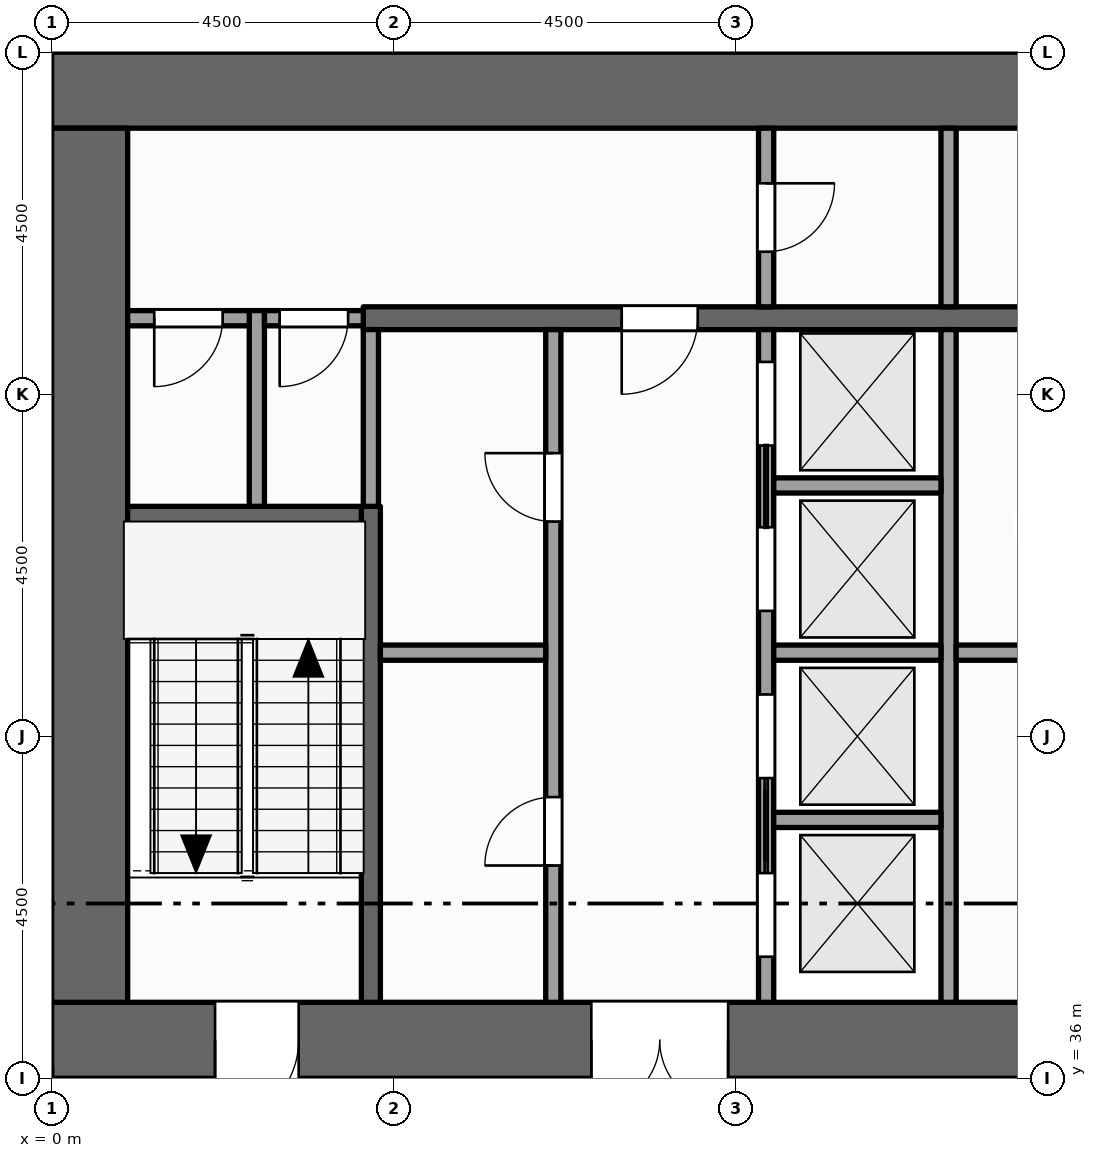
"""IFC4 building model, lengths in metres.
Left out: names, types, materials, properties, quantities, classifications, styles, units other than length and angle.
Written with IfcOpenShell. Run it as: python <this file> out.ifc"""

import sys

from ifc_helpers import new_model, si_unit, direction, frame, frame_2d, origin, place, context, subcontext, project, spatial, rectangle, extrude, element, fill, save


model = new_model("IFC4")
c1 = context("Model", 3, precision=1e-05, world=origin(), true_north=direction((0.0, 1.0)))
c2 = subcontext(c1, "Body", "Model", "MODEL_VIEW")
j1 = project(units=[si_unit("LENGTHUNIT", "METRE"), si_unit("PLANEANGLEUNIT", "RADIAN")], contexts=[c1])
p1 = place(None, origin())
s1 = spatial("IfcSite", under=j1, at=p1, CompositionType="ELEMENT")
p2 = place(p1, origin())
s2 = spatial("IfcBuilding", under=s1, at=p2, CompositionType="ELEMENT")
p3 = place(p2, frame((0.0, 0.0, 155.0)))
s3 = spatial("IfcBuildingStorey", under=s2, at=p3, CompositionType="ELEMENT", Elevation=155.0)
p4 = place(p3, frame((0.0, 36.5, -0.15), z_axis=(0.0, 0.0, 1.0), x_axis=(1.0, 0.0, 0.0)))
e1 = element("IfcWall", 1, at=p4, inside=s3, PredefinedType="SHEAR", context=c2, shape_type="SweptSolid", body=[
    extrude(rectangle(XDim=22.5, YDim=1.0, at=frame_2d((11.25, 0.0))), origin(), (0.0, 0.0, 1.0), 4.0),
])
p5 = place(p4, frame((7.1, 0.0, 0.15)))
e2 = element("IfcOpeningElement", 2, at=p5, cuts=e1, PredefinedType="OPENING", context=c2, shape_type="SweptSolid", body=[
    extrude(rectangle(XDim=1.8, YDim=2.1, at=frame_2d((0.9, 1.05))), frame((0.0, 0.51, 0.0), z_axis=(0.0, -1.0, 0.0), x_axis=(1.0, 0.0, 0.0)), (0.0, 0.0, 1.0), 1.02),
])
p6 = place(p4, frame((13.15, 0.0, 0.15)))
e3 = element("IfcOpeningElement", 3, at=p6, cuts=e1, PredefinedType="OPENING", context=c2, shape_type="SweptSolid", body=[
    extrude(rectangle(XDim=1.1, YDim=2.1, at=frame_2d((0.55, 1.05))), frame((0.0, 0.51, 0.0), z_axis=(0.0, -1.0, 0.0), x_axis=(1.0, 0.0, 0.0)), (0.0, 0.0, 1.0), 1.02),
])
p7 = place(p4, frame((2.15, 0.0, 0.15)))
e4 = element("IfcOpeningElement", 4, at=p7, cuts=e1, PredefinedType="OPENING", context=c2, shape_type="SweptSolid", body=[
    extrude(rectangle(XDim=1.1, YDim=2.1, at=frame_2d((0.55, 1.05))), frame((0.0, 0.51, 0.0), z_axis=(0.0, -1.0, 0.0), x_axis=(1.0, 0.0, 0.0)), (0.0, 0.0, 1.0), 1.02),
])
p8 = place(p4, frame((19.35, 0.0, 0.15)))
e5 = element("IfcOpeningElement", 5, at=p8, cuts=e1, PredefinedType="OPENING", context=c2, shape_type="SweptSolid", body=[
    extrude(rectangle(XDim=1.1, YDim=2.1, at=frame_2d((0.55, 1.05))), frame((0.0, 0.51, 0.0), z_axis=(0.0, -1.0, 0.0), x_axis=(1.0, 0.0, 0.0)), (0.0, 0.0, 1.0), 1.02),
])
p9 = place(p3, frame((0.0, 49.0, -0.15), z_axis=(0.0, 0.0, 1.0), x_axis=(1.0, 0.0, 0.0)))
e6 = element("IfcWall", 6, at=p9, inside=s3, PredefinedType="SHEAR", context=c2, shape_type="SweptSolid", body=[
    extrude(rectangle(XDim=22.5, YDim=1.0, at=frame_2d((11.25, 0.0))), origin(), (0.0, 0.0, 1.0), 4.0),
])
p10 = place(p3, frame((0.5, 37.0, -0.15), z_axis=(0.0, 0.0, 1.0), x_axis=(0.0, 1.0, 0.0)))
e7 = element("IfcWall", 7, at=p10, inside=s3, PredefinedType="SHEAR", context=c2, shape_type="SweptSolid", body=[
    extrude(rectangle(XDim=11.5, YDim=1.0, at=frame_2d((5.75, 0.0))), origin(), (0.0, 0.0, 1.0), 4.0),
])
p11 = place(p3, frame((0.0, 36.0, 0.0), z_axis=(0.0, 0.0, 1.0), x_axis=(-1.0, 0.0, 0.0)))
e8 = element("IfcWall", 8, at=p11, inside=s3, PredefinedType="STANDARD", context=c2, shape_type="SweptSolid", body=[
    extrude(rectangle(XDim=1.05, YDim=0.3, at=frame_2d((0.525, 0.0))), origin(), (0.0, 0.0, 1.0), 2.87),
])
p12 = place(p3, frame((2.7, 43.525, 0.0), z_axis=(0.0, 0.0, 1.0), x_axis=(0.0, 1.0, 0.0)))
e9 = element("IfcWall", 9, at=p12, inside=s3, PredefinedType="PARTITIONING", context=c2, shape_type="SweptSolid", body=[
    extrude(rectangle(XDim=2.575, YDim=0.2, at=frame_2d((1.288, 0.0))), origin(), (0.0, 0.0, 1.0), 3.85),
])
p13 = place(p3, frame((4.2, 37.0, 0.0), z_axis=(0.0, 0.0, 1.0), x_axis=(0.0, 1.0, 0.0)))
e10 = element("IfcWall", 10, at=p13, inside=s3, PredefinedType="SHEAR", context=c2, shape_type="SweptSolid", body=[
    extrude(rectangle(XDim=6.525, YDim=0.25, at=frame_2d((3.262, 0.0))), origin(), (0.0, 0.0, 1.0), 3.85),
])
p14 = place(p3, frame((4.2, 43.525, 0.0), z_axis=(0.0, 0.0, 1.0), x_axis=(0.0, 1.0, 0.0)))
e11 = element("IfcWall", 11, at=p14, inside=s3, PredefinedType="PARTITIONING", context=c2, shape_type="SweptSolid", body=[
    extrude(rectangle(XDim=2.325, YDim=0.2, at=frame_2d((1.163, 0.0))), origin(), (0.0, 0.0, 1.0), 3.85),
])
p15 = place(p3, frame((6.6, 37.0, 0.0), z_axis=(0.0, 0.0, 1.0), x_axis=(0.0, 1.0, 0.0)))
e12 = element("IfcWall", 12, at=p15, inside=s3, PredefinedType="PARTITIONING", context=c2, shape_type="SweptSolid", body=[
    extrude(rectangle(XDim=8.85, YDim=0.2, at=frame_2d((4.425, 0.0))), origin(), (0.0, 0.0, 1.0), 3.85),
])
p16 = place(p15, frame((1.8, 0.0, 0.0)))
e13 = element("IfcOpeningElement", 13, at=p16, cuts=e12, PredefinedType="OPENING", context=c2, shape_type="SweptSolid", body=[
    extrude(rectangle(XDim=0.9, YDim=2.1, at=frame_2d((0.45, 1.05))), frame((0.0, 0.11, 0.0), z_axis=(0.0, -1.0, 0.0), x_axis=(1.0, 0.0, 0.0)), (0.0, 0.0, 1.0), 0.22),
])
p17 = place(p15, frame((6.325, 0.0, 0.0)))
e14 = element("IfcOpeningElement", 14, at=p17, cuts=e12, PredefinedType="OPENING", context=c2, shape_type="SweptSolid", body=[
    extrude(rectangle(XDim=0.9, YDim=2.1, at=frame_2d((0.45, 1.05))), frame((0.0, 0.11, 0.0), z_axis=(0.0, -1.0, 0.0), x_axis=(1.0, 0.0, 0.0)), (0.0, 0.0, 1.0), 0.22),
])
p18 = place(p3, frame((9.4, 37.0, 0.0), z_axis=(0.0, 0.0, 1.0), x_axis=(0.0, 1.0, 0.0)))
e15 = element("IfcWall", 15, at=p18, inside=s3, PredefinedType="SOLIDWALL", context=c2, shape_type="SweptSolid", body=[
    extrude(rectangle(XDim=8.85, YDim=0.2, at=frame_2d((4.425, 0.0))), origin(), (0.0, 0.0, 1.0), 3.85),
])
p19 = place(p18, frame((0.6, 0.0, 0.012)))
e16 = element("IfcOpeningElement", 16, at=p19, cuts=e15, PredefinedType="OPENING", context=c2, shape_type="SweptSolid", body=[
    extrude(rectangle(XDim=1.1, YDim=2.1, at=frame_2d((0.55, 1.05))), frame((0.0, 0.11, 0.0), z_axis=(0.0, -1.0, 0.0), x_axis=(1.0, 0.0, 0.0)), (0.0, 0.0, 1.0), 0.22),
])
p20 = place(p18, frame((2.95, 0.0, 0.012)))
e17 = element("IfcOpeningElement", 17, at=p20, cuts=e15, PredefinedType="OPENING", context=c2, shape_type="SweptSolid", body=[
    extrude(rectangle(XDim=1.1, YDim=2.1, at=frame_2d((0.55, 1.05))), frame((0.0, 0.11, 0.0), z_axis=(0.0, -1.0, 0.0), x_axis=(1.0, 0.0, 0.0)), (0.0, 0.0, 1.0), 0.22),
])
p21 = place(p18, frame((5.15, 0.0, 0.012)))
e18 = element("IfcOpeningElement", 18, at=p21, cuts=e15, PredefinedType="OPENING", context=c2, shape_type="SweptSolid", body=[
    extrude(rectangle(XDim=1.1, YDim=2.1, at=frame_2d((0.55, 1.05))), frame((0.0, 0.11, 0.0), z_axis=(0.0, -1.0, 0.0), x_axis=(1.0, 0.0, 0.0)), (0.0, 0.0, 1.0), 0.22),
])
p22 = place(p18, frame((7.325, 0.0, 0.012)))
e19 = element("IfcOpeningElement", 19, at=p22, cuts=e15, PredefinedType="OPENING", context=c2, shape_type="SweptSolid", body=[
    extrude(rectangle(XDim=1.1, YDim=2.1, at=frame_2d((0.55, 1.05))), frame((0.0, 0.11, 0.0), z_axis=(0.0, -1.0, 0.0), x_axis=(1.0, 0.0, 0.0)), (0.0, 0.0, 1.0), 0.22),
])
p23 = place(p3, frame((9.4, 46.15, 0.0), z_axis=(0.0, 0.0, 1.0), x_axis=(0.0, 1.0, 0.0)))
e20 = element("IfcWall", 20, at=p23, inside=s3, PredefinedType="PARTITIONING", context=c2, shape_type="SweptSolid", body=[
    extrude(rectangle(XDim=2.35, YDim=0.2, at=frame_2d((1.175, 0.0))), origin(), (0.0, 0.0, 1.0), 3.85),
])
p24 = place(p23, frame((0.725, 0.0, 0.0)))
e21 = element("IfcOpeningElement", 21, at=p24, cuts=e20, PredefinedType="OPENING", context=c2, shape_type="SweptSolid", body=[
    extrude(rectangle(XDim=0.9, YDim=2.1, at=frame_2d((0.45, 1.05))), frame((0.0, 0.11, 0.0), z_axis=(0.0, -1.0, 0.0), x_axis=(1.0, 0.0, 0.0)), (0.0, 0.0, 1.0), 0.22),
])
p25 = place(p3, frame((11.8, 37.0, 0.0), z_axis=(0.0, 0.0, 1.0), x_axis=(0.0, 1.0, 0.0)))
e22 = element("IfcWall", 22, at=p25, inside=s3, PredefinedType="SOLIDWALL", context=c2, shape_type="SweptSolid", body=[
    extrude(rectangle(XDim=8.85, YDim=0.2, at=frame_2d((4.425, 0.0))), origin(), (0.0, 0.0, 1.0), 3.85),
])
p26 = place(p3, frame((11.8, 46.15, 0.0), z_axis=(0.0, 0.0, 1.0), x_axis=(0.0, 1.0, 0.0)))
e23 = element("IfcWall", 23, at=p26, inside=s3, PredefinedType="PARTITIONING", context=c2, shape_type="SweptSolid", body=[
    extrude(rectangle(XDim=2.35, YDim=0.2, at=frame_2d((1.175, 0.0))), origin(), (0.0, 0.0, 1.0), 3.85),
])
p27 = place(p3, frame((9.5, 39.4, 0.0), z_axis=(0.0, 0.0, 1.0), x_axis=(1.0, 0.0, 0.0)))
e24 = element("IfcWall", 24, at=p27, inside=s3, PredefinedType="SOLIDWALL", context=c2, shape_type="SweptSolid", body=[
    extrude(rectangle(XDim=2.2, YDim=0.2, at=frame_2d((1.1, 0.0))), origin(), (0.0, 0.0, 1.0), 3.85),
])
p28 = place(p3, frame((4.325, 41.6, 0.0), z_axis=(0.0, 0.0, 1.0), x_axis=(1.0, 0.0, 0.0)))
e25 = element("IfcWall", 25, at=p28, inside=s3, PredefinedType="PARTITIONING", context=c2, shape_type="SweptSolid", body=[
    extrude(rectangle(XDim=2.175, YDim=0.2, at=frame_2d((1.087, 0.0))), origin(), (0.0, 0.0, 1.0), 3.85),
])
p29 = place(p3, frame((9.5, 41.6, 0.0), z_axis=(0.0, 0.0, 1.0), x_axis=(1.0, 0.0, 0.0)))
e26 = element("IfcWall", 26, at=p29, inside=s3, PredefinedType="SOLIDWALL", context=c2, shape_type="SweptSolid", body=[
    extrude(rectangle(XDim=2.2, YDim=0.2, at=frame_2d((1.1, 0.0))), origin(), (0.0, 0.0, 1.0), 3.85),
])
p30 = place(p3, frame((11.9, 41.6, 0.0), z_axis=(0.0, 0.0, 1.0), x_axis=(1.0, 0.0, 0.0)))
e27 = element("IfcWall", 27, at=p30, inside=s3, PredefinedType="PARTITIONING", context=c2, shape_type="SweptSolid", body=[
    extrude(rectangle(XDim=3.6, YDim=0.2, at=frame_2d((1.8, 0.0))), origin(), (0.0, 0.0, 1.0), 3.85),
])
p31 = place(p30, frame((1.3, 0.0, 0.0)))
e28 = element("IfcOpeningElement", 28, at=p31, cuts=e27, PredefinedType="OPENING", context=c2, shape_type="SweptSolid", body=[
    extrude(rectangle(XDim=1.0, YDim=2.1, at=frame_2d((0.5, 1.05))), frame((0.0, 0.11, 0.0), z_axis=(0.0, -1.0, 0.0), x_axis=(1.0, 0.0, 0.0)), (0.0, 0.0, 1.0), 0.22),
])
p32 = place(p3, frame((1.0, 43.4, 0.0), z_axis=(0.0, 0.0, 1.0), x_axis=(1.0, 0.0, 0.0)))
e29 = element("IfcWall", 29, at=p32, inside=s3, PredefinedType="SHEAR", context=c2, shape_type="SweptSolid", body=[
    extrude(rectangle(XDim=3.075, YDim=0.25, at=frame_2d((1.538, 0.0))), origin(), (0.0, 0.0, 1.0), 3.85),
])
p33 = place(p3, frame((9.5, 43.8, 0.0), z_axis=(0.0, 0.0, 1.0), x_axis=(1.0, 0.0, 0.0)))
e30 = element("IfcWall", 30, at=p33, inside=s3, PredefinedType="SOLIDWALL", context=c2, shape_type="SweptSolid", body=[
    extrude(rectangle(XDim=2.2, YDim=0.2, at=frame_2d((1.1, 0.0))), origin(), (0.0, 0.0, 1.0), 3.85),
])
p34 = place(p3, frame((1.0, 46.0, 0.0), z_axis=(0.0, 0.0, 1.0), x_axis=(1.0, 0.0, 0.0)))
e31 = element("IfcWall", 31, at=p34, inside=s3, PredefinedType="PARTITIONING", context=c2, shape_type="SweptSolid", body=[
    extrude(rectangle(XDim=1.6, YDim=0.2, at=frame_2d((0.8, 0.0))), origin(), (0.0, 0.0, 1.0), 3.85),
])
p35 = place(p34, frame((0.35, 0.0, 0.0)))
e32 = element("IfcOpeningElement", 32, at=p35, cuts=e31, PredefinedType="OPENING", context=c2, shape_type="SweptSolid", body=[
    extrude(rectangle(XDim=0.9, YDim=2.1, at=frame_2d((0.45, 1.05))), frame((0.0, 0.11, 0.0), z_axis=(0.0, -1.0, 0.0), x_axis=(1.0, 0.0, 0.0)), (0.0, 0.0, 1.0), 0.22),
])
p36 = place(p3, frame((2.8, 46.0, 0.0), z_axis=(0.0, 0.0, 1.0), x_axis=(1.0, 0.0, 0.0)))
e33 = element("IfcWall", 33, at=p36, inside=s3, PredefinedType="PARTITIONING", context=c2, shape_type="SweptSolid", body=[
    extrude(rectangle(XDim=1.3, YDim=0.2, at=frame_2d((0.65, 0.0))), origin(), (0.0, 0.0, 1.0), 3.85),
])
p37 = place(p36, frame((0.2, 0.0, 0.0)))
e34 = element("IfcOpeningElement", 34, at=p37, cuts=e33, PredefinedType="OPENING", context=c2, shape_type="SweptSolid", body=[
    extrude(rectangle(XDim=0.9, YDim=2.1, at=frame_2d((0.45, 1.05))), frame((0.0, 0.11, 0.0), z_axis=(0.0, -1.0, 0.0), x_axis=(1.0, 0.0, 0.0)), (0.0, 0.0, 1.0), 0.22),
])
p38 = place(p3, frame((4.1, 46.0, 0.0), z_axis=(0.0, 0.0, 1.0), x_axis=(1.0, 0.0, 0.0)))
e35 = element("IfcWall", 35, at=p38, inside=s3, PredefinedType="SHEAR", context=c2, shape_type="SweptSolid", body=[
    extrude(rectangle(XDim=14.5, YDim=0.3, at=frame_2d((7.25, 0.0))), origin(), (0.0, 0.0, 1.0), 3.85),
])
p39 = place(p38, frame((3.4, 0.0, 0.0)))
e36 = element("IfcOpeningElement", 36, at=p39, cuts=e35, PredefinedType="OPENING", context=c2, shape_type="SweptSolid", body=[
    extrude(rectangle(XDim=1.0, YDim=2.1, at=frame_2d((0.5, 1.05))), frame((0.0, 0.16, 0.0), z_axis=(0.0, -1.0, 0.0), x_axis=(1.0, 0.0, 0.0)), (0.0, 0.0, 1.0), 0.32),
])
p40 = place(p38, frame((9.1, 0.0, 0.0)))
e37 = element("IfcOpeningElement", 37, at=p40, cuts=e35, PredefinedType="OPENING", context=c2, shape_type="SweptSolid", body=[
    extrude(rectangle(XDim=1.0, YDim=2.1, at=frame_2d((0.5, 1.05))), frame((0.0, 0.16, 0.0), z_axis=(0.0, -1.0, 0.0), x_axis=(1.0, 0.0, 0.0)), (0.0, 0.0, 1.0), 0.32),
])
p41 = place(p19, origin())
e38 = element("IfcDoor", 38, at=p41, inside=s3, OperationType="SLIDING_TO_RIGHT", PredefinedType="DOOR", context=c2, shape_type="SweptSolid", body=[
    extrude(rectangle(XDim=1.1, YDim=2.1, at=frame_2d((0.55, 1.05))), frame((0.0, 0.025, 0.0), z_axis=(0.0, -1.0, 0.0), x_axis=(1.0, 0.0, 0.0)), (0.0, 0.0, 1.0), 0.05),
])
fill(e16, e38)
p42 = place(p20, origin())
e39 = element("IfcDoor", 39, at=p42, inside=s3, OperationType="SLIDING_TO_LEFT", PredefinedType="DOOR", context=c2, shape_type="SweptSolid", body=[
    extrude(rectangle(XDim=1.1, YDim=2.1, at=frame_2d((0.55, 1.05))), frame((0.0, 0.025, 0.0), z_axis=(0.0, -1.0, 0.0), x_axis=(1.0, 0.0, 0.0)), (0.0, 0.0, 1.0), 0.05),
])
fill(e17, e39)
p43 = place(p21, origin())
e40 = element("IfcDoor", 40, at=p43, inside=s3, OperationType="SLIDING_TO_RIGHT", PredefinedType="DOOR", context=c2, shape_type="SweptSolid", body=[
    extrude(rectangle(XDim=1.1, YDim=2.1, at=frame_2d((0.55, 1.05))), frame((0.0, 0.025, 0.0), z_axis=(0.0, -1.0, 0.0), x_axis=(1.0, 0.0, 0.0)), (0.0, 0.0, 1.0), 0.05),
])
fill(e18, e40)
p44 = place(p22, origin())
e41 = element("IfcDoor", 41, at=p44, inside=s3, OperationType="SLIDING_TO_LEFT", PredefinedType="DOOR", context=c2, shape_type="SweptSolid", body=[
    extrude(rectangle(XDim=1.1, YDim=2.1, at=frame_2d((0.55, 1.05))), frame((0.0, 0.025, 0.0), z_axis=(0.0, -1.0, 0.0), x_axis=(1.0, 0.0, 0.0)), (0.0, 0.0, 1.0), 0.05),
])
fill(e19, e41)
p45 = place(p5, origin())
e42 = element("IfcDoor", 42, at=p45, inside=s3, OperationType="DOUBLE_DOOR_SINGLE_SWING", PredefinedType="DOOR", context=c2, shape_type="SweptSolid", body=[
    extrude(rectangle(XDim=1.8, YDim=2.1, at=frame_2d((0.9, 1.05))), frame((0.0, 0.025, 0.0), z_axis=(0.0, -1.0, 0.0), x_axis=(1.0, 0.0, 0.0)), (0.0, 0.0, 1.0), 0.05),
])
fill(e2, e42)
p46 = place(p39, origin())
e43 = element("IfcDoor", 43, at=p46, inside=s3, OperationType="SINGLE_SWING_LEFT", PredefinedType="DOOR", context=c2, shape_type="SweptSolid", body=[
    extrude(rectangle(XDim=1.0, YDim=2.1, at=frame_2d((0.5, 1.05))), frame((0.0, 0.025, 0.0), z_axis=(0.0, -1.0, 0.0), x_axis=(1.0, 0.0, 0.0)), (0.0, 0.0, 1.0), 0.05),
])
fill(e36, e43)
p47 = place(p24, origin())
e44 = element("IfcDoor", 44, at=p47, inside=s3, OperationType="SINGLE_SWING_RIGHT", PredefinedType="DOOR", context=c2, shape_type="SweptSolid", body=[
    extrude(rectangle(XDim=0.9, YDim=2.1, at=frame_2d((0.45, 1.05))), frame((0.0, 0.025, 0.0), z_axis=(0.0, -1.0, 0.0), x_axis=(1.0, 0.0, 0.0)), (0.0, 0.0, 1.0), 0.05),
])
fill(e21, e44)
p48 = place(p7, origin())
e45 = element("IfcDoor", 45, at=p48, inside=s3, OperationType="SINGLE_SWING_LEFT", PredefinedType="DOOR", context=c2, shape_type="SweptSolid", body=[
    extrude(rectangle(XDim=1.1, YDim=2.1, at=frame_2d((0.55, 1.05))), frame((0.0, 0.025, 0.0), z_axis=(0.0, -1.0, 0.0), x_axis=(1.0, 0.0, 0.0)), (0.0, 0.0, 1.0), 0.05),
])
fill(e4, e45)
p49 = place(p35, origin())
e46 = element("IfcDoor", 46, at=p49, inside=s3, OperationType="SINGLE_SWING_LEFT", PredefinedType="DOOR", context=c2, shape_type="SweptSolid", body=[
    extrude(rectangle(XDim=0.9, YDim=2.1, at=frame_2d((0.45, 1.05))), frame((0.0, 0.025, 0.0), z_axis=(0.0, -1.0, 0.0), x_axis=(1.0, 0.0, 0.0)), (0.0, 0.0, 1.0), 0.05),
])
fill(e32, e46)
p50 = place(p37, origin())
e47 = element("IfcDoor", 47, at=p50, inside=s3, OperationType="SINGLE_SWING_LEFT", PredefinedType="DOOR", context=c2, shape_type="SweptSolid", body=[
    extrude(rectangle(XDim=0.9, YDim=2.1, at=frame_2d((0.45, 1.05))), frame((0.0, 0.025, 0.0), z_axis=(0.0, -1.0, 0.0), x_axis=(1.0, 0.0, 0.0)), (0.0, 0.0, 1.0), 0.05),
])
fill(e34, e47)
p51 = place(p16, origin())
e48 = element("IfcDoor", 48, at=p51, inside=s3, OperationType="SINGLE_SWING_LEFT", PredefinedType="DOOR", context=c2, shape_type="SweptSolid", body=[
    extrude(rectangle(XDim=0.9, YDim=2.1, at=frame_2d((0.45, 1.05))), frame((0.0, 0.025, 0.0), z_axis=(0.0, -1.0, 0.0), x_axis=(1.0, 0.0, 0.0)), (0.0, 0.0, 1.0), 0.05),
])
fill(e13, e48)
p52 = place(p17, origin())
e49 = element("IfcDoor", 49, at=p52, inside=s3, OperationType="SINGLE_SWING_RIGHT", PredefinedType="DOOR", context=c2, shape_type="SweptSolid", body=[
    extrude(rectangle(XDim=0.9, YDim=2.1, at=frame_2d((0.45, 1.05))), frame((0.0, 0.025, 0.0), z_axis=(0.0, -1.0, 0.0), x_axis=(1.0, 0.0, 0.0)), (0.0, 0.0, 1.0), 0.05),
])
fill(e14, e49)
save(model, sys.argv[1])
